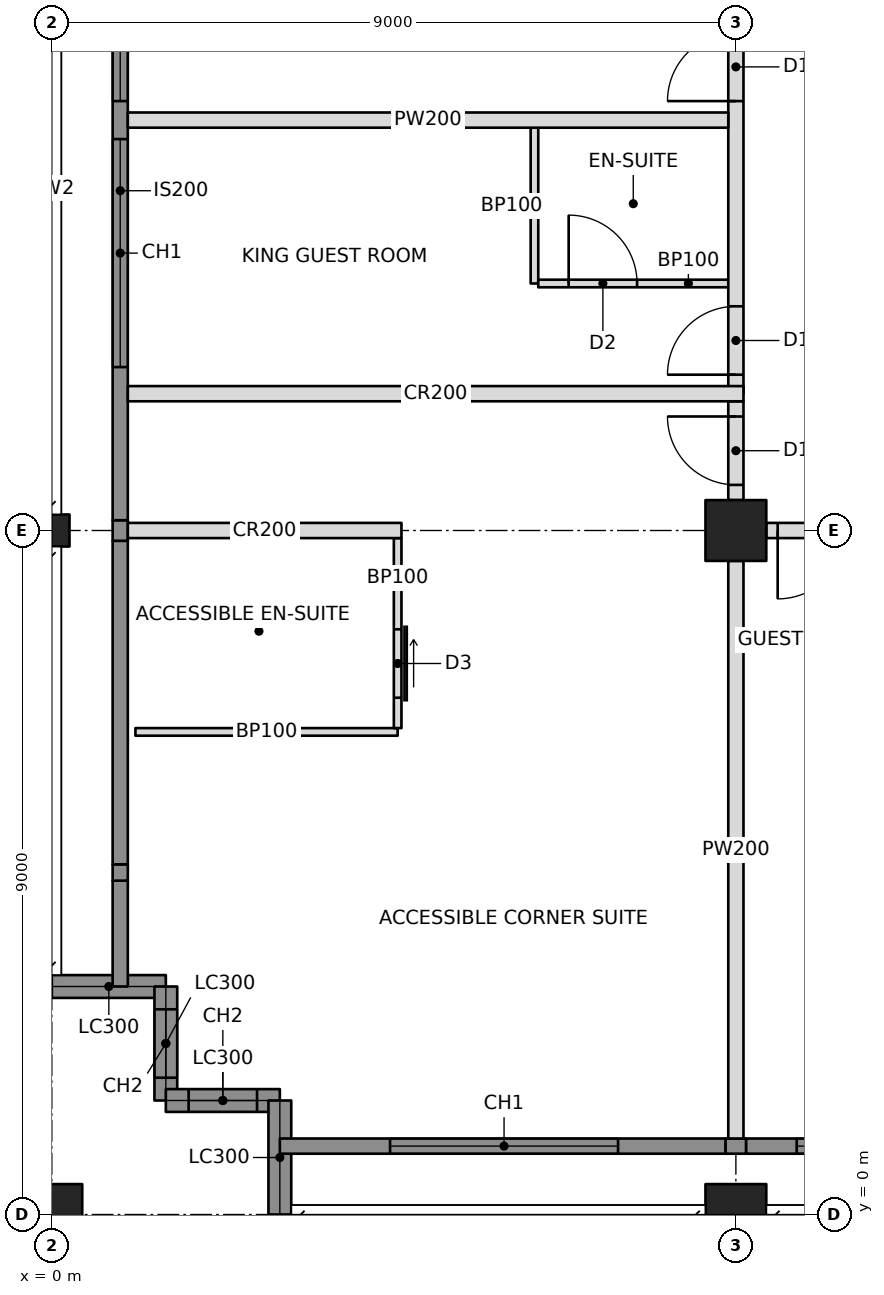
"""IFC4 building model, lengths in metres.
Left out: names, types, materials, properties, quantities, classifications, styles, units other than length and angle.
Written with IfcOpenShell. Run it as: python <this file> out.ifc"""

import sys

from ifc_helpers import new_model, si_unit, direction, frame, frame_2d, origin, origin_with_axes, origin_2d, place, context, subcontext, project, spatial, rectangle, hollow_rectangle, i_section, extrude, element, fill, save


model = new_model("IFC4")
c1 = context("Model", 3, precision=1e-05, world=origin(), true_north=direction((0.0, 1.0)))
c2 = subcontext(c1, "Body", "Model", "MODEL_VIEW")
j1 = project(units=[si_unit("LENGTHUNIT", "METRE"), si_unit("PLANEANGLEUNIT", "RADIAN")], contexts=[c1])
p1 = place(None, origin())
s1 = spatial("IfcSite", under=j1, at=p1, CompositionType="ELEMENT")
p2 = place(p1, origin())
s2 = spatial("IfcBuilding", under=s1, at=p2, CompositionType="ELEMENT")
p3 = place(p2, frame((0.0, 0.0, 241.0)))
s3 = spatial("IfcBuildingStorey", under=s2, at=p3, CompositionType="ELEMENT", Elevation=241.0)
p4 = place(p3, origin_with_axes())
e1 = element("IfcColumn", 1, at=p4, inside=s3, PredefinedType="COLUMN", context=c2, shape_type="SweptSolid", body=[
    extrude(hollow_rectangle(XDim=0.8, YDim=0.8, WallThickness=0.05, at=origin_2d()), origin(), (0.0, 0.0, 1.0), 3.6),
])
p5 = place(p3, frame((0.0, 9.0, 0.0), z_axis=(0.0, 0.0, 1.0), x_axis=(0.0, 1.0, 0.0)))
e2 = element("IfcColumn", 2, at=p5, inside=s3, PredefinedType="COLUMN", context=c2, shape_type="SweptSolid", body=[
    extrude(i_section(OverallWidth=0.422, OverallDepth=0.465, WebThickness=0.045, FlangeThickness=0.073, at=origin_2d()), origin(), (0.0, 0.0, 1.0), 3.6),
])
p6 = place(p3, frame((9.0, 0.0, 0.0), z_axis=(0.0, 0.0, 1.0), x_axis=(1.0, 0.0, 0.0)))
e3 = element("IfcColumn", 3, at=p6, inside=s3, PredefinedType="COLUMN", context=c2, shape_type="SweptSolid", body=[
    extrude(hollow_rectangle(XDim=0.8, YDim=0.8, WallThickness=0.05, at=origin_2d()), origin(), (0.0, 0.0, 1.0), 3.6),
])
p7 = place(p3, frame((9.0, 9.0, 0.0), z_axis=(0.0, 0.0, 1.0), x_axis=(1.0, 0.0, 0.0)))
e4 = element("IfcColumn", 4, at=p7, inside=s3, PredefinedType="COLUMN", context=c2, shape_type="SweptSolid", body=[
    extrude(hollow_rectangle(XDim=0.8, YDim=0.8, WallThickness=0.04, at=origin_2d()), origin(), (0.0, 0.0, 1.0), 3.6),
])
p8 = place(p3, frame((0.0, 3.0, 0.0), z_axis=(0.0, 0.0, 1.0), x_axis=(1.0, 0.0, 0.0)))
e5 = element("IfcWall", 5, at=p8, inside=s3, PredefinedType="SOLIDWALL", context=c2, shape_type="SweptSolid", body=[
    extrude(rectangle(XDim=1.5, YDim=0.3, at=frame_2d((0.75, 0.0))), origin(), (0.0, 0.0, 1.0), 2.62),
])
p9 = place(p3, frame((1.5, 3.0, 0.0), z_axis=(0.0, 0.0, 1.0), x_axis=(0.0, -1.0, 0.0)))
e6 = element("IfcWall", 6, at=p9, inside=s3, PredefinedType="SOLIDWALL", context=c2, shape_type="SweptSolid", body=[
    extrude(rectangle(XDim=1.5, YDim=0.3, at=frame_2d((0.75, 0.0))), origin(), (0.0, 0.0, 1.0), 3.4),
])
p10 = place(p9, frame((0.3, 0.0, 0.6)))
e7 = element("IfcOpeningElement", 7, at=p10, cuts=e6, PredefinedType="OPENING", context=c2, shape_type="SweptSolid", body=[
    extrude(rectangle(XDim=0.9, YDim=2.2, at=frame_2d((0.45, 1.1))), frame((0.0, 0.16, 0.0), z_axis=(0.0, -1.0, 0.0), x_axis=(1.0, 0.0, 0.0)), (0.0, 0.0, 1.0), 0.32),
])
p11 = place(p3, frame((1.5, 1.5, 0.0), z_axis=(0.0, 0.0, 1.0), x_axis=(1.0, 0.0, 0.0)))
e8 = element("IfcWall", 8, at=p11, inside=s3, PredefinedType="SOLIDWALL", context=c2, shape_type="SweptSolid", body=[
    extrude(rectangle(XDim=1.5, YDim=0.3, at=frame_2d((0.75, 0.0))), origin(), (0.0, 0.0, 1.0), 3.4),
])
p12 = place(p11, frame((0.3, 0.0, 0.6)))
e9 = element("IfcOpeningElement", 9, at=p12, cuts=e8, PredefinedType="OPENING", context=c2, shape_type="SweptSolid", body=[
    extrude(rectangle(XDim=0.9, YDim=2.2, at=frame_2d((0.45, 1.1))), frame((0.0, 0.16, 0.0), z_axis=(0.0, -1.0, 0.0), x_axis=(1.0, 0.0, 0.0)), (0.0, 0.0, 1.0), 0.32),
])
p13 = place(p3, frame((3.0, 1.5, 0.0), z_axis=(0.0, 0.0, 1.0), x_axis=(0.0, -1.0, 0.0)))
e10 = element("IfcWall", 10, at=p13, inside=s3, PredefinedType="SOLIDWALL", context=c2, shape_type="SweptSolid", body=[
    extrude(rectangle(XDim=1.5, YDim=0.3, at=frame_2d((0.75, 0.0))), origin(), (0.0, 0.0, 1.0), 2.62),
])
p14 = place(p3, frame((3.0, 0.9, 0.0), z_axis=(0.0, 0.0, 1.0), x_axis=(1.0, 0.0, 0.0)))
e11 = element("IfcWall", 11, at=p14, inside=s3, PredefinedType="SOLIDWALL", context=c2, shape_type="SweptSolid", body=[
    extrude(rectangle(XDim=5.865, YDim=0.2, at=frame_2d((2.932, 0.0))), origin(), (0.0, 0.0, 1.0), 3.4),
])
p15 = place(p14, frame((1.45, 0.0, 0.6)))
e12 = element("IfcOpeningElement", 12, at=p15, cuts=e11, PredefinedType="OPENING", context=c2, shape_type="SweptSolid", body=[
    extrude(rectangle(XDim=3.0, YDim=2.2, at=frame_2d((1.5, 1.1))), frame((0.0, 0.11, 0.0), z_axis=(0.0, -1.0, 0.0), x_axis=(1.0, 0.0, 0.0)), (0.0, 0.0, 1.0), 0.22),
])
p16 = place(p3, frame((0.9, 3.0, 0.0), z_axis=(0.0, 0.0, 1.0), x_axis=(0.0, 1.0, 0.0)))
e13 = element("IfcWall", 13, at=p16, inside=s3, PredefinedType="SOLIDWALL", context=c2, shape_type="SweptSolid", body=[
    extrude(rectangle(XDim=1.393, YDim=0.2, at=frame_2d((0.696, 0.0))), origin(), (0.0, 0.0, 1.0), 3.4),
])
p17 = place(p3, frame((1.0, 9.0, 0.0), z_axis=(0.0, 0.0, 1.0), x_axis=(1.0, 0.0, 0.0)))
e14 = element("IfcWall", 14, at=p17, inside=s3, PredefinedType="PARTITIONING", context=c2, shape_type="SweptSolid", body=[
    extrude(rectangle(XDim=3.6, YDim=0.2, at=frame_2d((1.8, 0.0))), origin(), (0.0, 0.0, 1.0), 2.638),
])
p18 = place(p3, frame((9.4, 9.0, 0.0), z_axis=(0.0, 0.0, 1.0), x_axis=(1.0, 0.0, 0.0)))
e15 = element("IfcWall", 15, at=p18, inside=s3, PredefinedType="PARTITIONING", context=c2, shape_type="SweptSolid", body=[
    extrude(rectangle(XDim=8.2, YDim=0.2, at=frame_2d((4.1, 0.0))), origin(), (0.0, 0.0, 1.0), 2.605),
])
p19 = place(p18, frame((0.15, 0.0, 0.0)))
e16 = element("IfcOpeningElement", 16, at=p19, cuts=e15, PredefinedType="OPENING", context=c2, shape_type="SweptSolid", body=[
    extrude(rectangle(XDim=0.9, YDim=2.1, at=frame_2d((0.45, 1.05))), frame((0.0, 0.11, 0.0), z_axis=(0.0, -1.0, 0.0), x_axis=(1.0, 0.0, 0.0)), (0.0, 0.0, 1.0), 0.22),
])
p20 = place(p3, frame((9.0, 10.8, 0.0), z_axis=(0.0, 0.0, 1.0), x_axis=(0.0, 1.0, 0.0)))
e17 = element("IfcWall", 17, at=p20, inside=s3, PredefinedType="PARTITIONING", context=c2, shape_type="SweptSolid", body=[
    extrude(rectangle(XDim=6.8, YDim=0.2, at=frame_2d((3.4, 0.0))), origin(), (0.0, 0.0, 1.0), 2.605),
])
p21 = place(p20, frame((0.25, 0.0, 0.0)))
e18 = element("IfcOpeningElement", 18, at=p21, cuts=e17, PredefinedType="OPENING", context=c2, shape_type="SweptSolid", body=[
    extrude(rectangle(XDim=0.9, YDim=2.1, at=frame_2d((0.45, 1.05))), frame((0.0, 0.11, 0.0), z_axis=(0.0, -1.0, 0.0), x_axis=(1.0, 0.0, 0.0)), (0.0, 0.0, 1.0), 0.22),
])
p22 = place(p20, frame((3.85, 0.0, 0.0)))
e19 = element("IfcOpeningElement", 19, at=p22, cuts=e17, PredefinedType="OPENING", context=c2, shape_type="SweptSolid", body=[
    extrude(rectangle(XDim=0.9, YDim=2.1, at=frame_2d((0.45, 1.05))), frame((0.0, 0.11, 0.0), z_axis=(0.0, -1.0, 0.0), x_axis=(1.0, 0.0, 0.0)), (0.0, 0.0, 1.0), 0.22),
])
p23 = place(p3, frame((1.0, 10.8, 0.0), z_axis=(0.0, 0.0, 1.0), x_axis=(1.0, 0.0, 0.0)))
e20 = element("IfcWall", 20, at=p23, inside=s3, PredefinedType="PARTITIONING", context=c2, shape_type="SweptSolid", body=[
    extrude(rectangle(XDim=8.1, YDim=0.2, at=frame_2d((4.05, 0.0))), origin(), (0.0, 0.0, 1.0), 2.604),
])
p24 = place(p3, frame((9.0, 8.6, 0.0), z_axis=(0.0, 0.0, 1.0), x_axis=(0.0, -1.0, 0.0)))
e21 = element("IfcWall", 21, at=p24, inside=s3, PredefinedType="PARTITIONING", context=c2, shape_type="SweptSolid", body=[
    extrude(rectangle(XDim=7.6, YDim=0.2, at=frame_2d((3.8, 0.0))), origin(), (0.0, 0.0, 1.0), 2.638),
])
p25 = place(p3, frame((1.1, 6.35, 0.0), z_axis=(0.0, 0.0, 1.0), x_axis=(1.0, 0.0, 0.0)))
e22 = element("IfcWall", 22, at=p25, inside=s3, PredefinedType="PARTITIONING", context=c2, shape_type="SweptSolid", body=[
    extrude(rectangle(XDim=3.45, YDim=0.1, at=frame_2d((1.725, 0.0))), origin(), (0.0, 0.0, 1.0), 3.4),
])
p26 = place(p3, frame((4.55, 8.9, 0.0), z_axis=(0.0, 0.0, 1.0), x_axis=(0.0, -1.0, 0.0)))
e23 = element("IfcWall", 23, at=p26, inside=s3, PredefinedType="PARTITIONING", context=c2, shape_type="SweptSolid", body=[
    extrude(rectangle(XDim=2.5, YDim=0.1, at=frame_2d((1.25, 0.0))), origin(), (0.0, 0.0, 1.0), 2.638),
])
p27 = place(p26, frame((1.2, 0.0, 0.0)))
e24 = element("IfcOpeningElement", 24, at=p27, cuts=e23, PredefinedType="OPENING", context=c2, shape_type="SweptSolid", body=[
    extrude(rectangle(XDim=0.9, YDim=2.1, at=frame_2d((0.45, 1.05))), frame((0.0, 0.06, 0.0), z_axis=(0.0, -1.0, 0.0), x_axis=(1.0, 0.0, 0.0)), (0.0, 0.0, 1.0), 0.12),
])
p28 = place(p3, frame((8.9, 14.4, 0.0), z_axis=(0.0, 0.0, 1.0), x_axis=(-1.0, 0.0, 0.0)))
e25 = element("IfcWall", 25, at=p28, inside=s3, PredefinedType="PARTITIONING", context=c2, shape_type="SweptSolid", body=[
    extrude(rectangle(XDim=7.9, YDim=0.2, at=frame_2d((3.95, 0.0))), origin(), (0.0, 0.0, 1.0), 2.604),
])
p29 = place(p3, frame((6.35, 12.25, 0.0), z_axis=(0.0, 0.0, 1.0), x_axis=(0.0, 1.0, 0.0)))
e26 = element("IfcWall", 26, at=p29, inside=s3, PredefinedType="PARTITIONING", context=c2, shape_type="SweptSolid", body=[
    extrude(rectangle(XDim=2.05, YDim=0.1, at=frame_2d((1.025, 0.0))), origin(), (0.0, 0.0, 1.0), 3.4),
])
p30 = place(p3, frame((8.9, 12.25, 0.0), z_axis=(0.0, 0.0, 1.0), x_axis=(-1.0, 0.0, 0.0)))
e27 = element("IfcWall", 27, at=p30, inside=s3, PredefinedType="PARTITIONING", context=c2, shape_type="SweptSolid", body=[
    extrude(rectangle(XDim=2.5, YDim=0.1, at=frame_2d((1.25, 0.0))), origin(), (0.0, 0.0, 1.0), 2.604),
])
p31 = place(p30, frame((1.2, 0.0, 0.0)))
e28 = element("IfcOpeningElement", 28, at=p31, cuts=e27, PredefinedType="OPENING", context=c2, shape_type="SweptSolid", body=[
    extrude(rectangle(XDim=0.9, YDim=2.1, at=frame_2d((0.45, 1.05))), frame((0.0, 0.06, 0.0), z_axis=(0.0, -1.0, 0.0), x_axis=(1.0, 0.0, 0.0)), (0.0, 0.0, 1.0), 0.12),
])
p32 = place(p3, frame((9.0, 9.4, 0.0), z_axis=(0.0, 0.0, 1.0), x_axis=(0.0, 1.0, 0.0)))
e29 = element("IfcWall", 29, at=p32, inside=s3, PredefinedType="PARTITIONING", context=c2, shape_type="SweptSolid", body=[
    extrude(rectangle(XDim=1.3, YDim=0.2, at=frame_2d((0.65, 0.0))), origin(), (0.0, 0.0, 1.0), 2.605),
])
p33 = place(p32, frame((0.2, 0.0, 0.0)))
e30 = element("IfcOpeningElement", 30, at=p33, cuts=e29, PredefinedType="OPENING", context=c2, shape_type="SweptSolid", body=[
    extrude(rectangle(XDim=0.9, YDim=2.1, at=frame_2d((0.45, 1.05))), frame((0.0, 0.11, 0.0), z_axis=(0.0, -1.0, 0.0), x_axis=(1.0, 0.0, 0.0)), (0.0, 0.0, 1.0), 0.22),
])
p34 = place(p3, frame((8.865, 0.9, 0.0), z_axis=(0.0, 0.0, 1.0), x_axis=(1.0, 0.0, 0.0)))
e31 = element("IfcWall", 31, at=p34, inside=s3, PredefinedType="SOLIDWALL", context=c2, shape_type="SweptSolid", body=[
    extrude(rectangle(XDim=0.271, YDim=0.2, at=frame_2d((0.135, 0.0))), origin(), (0.0, 0.0, 1.0), 2.638),
])
p35 = place(p3, frame((9.135, 0.9, 0.0), z_axis=(0.0, 0.0, 1.0), x_axis=(1.0, 0.0, 0.0)))
e32 = element("IfcWall", 32, at=p35, inside=s3, PredefinedType="SOLIDWALL", context=c2, shape_type="SweptSolid", body=[
    extrude(rectangle(XDim=8.671, YDim=0.2, at=frame_2d((4.335, 0.0))), origin(), (0.0, 0.0, 1.0), 3.4),
])
p36 = place(p35, frame((0.665, 0.0, 0.6)))
e33 = element("IfcOpeningElement", 33, at=p36, cuts=e32, PredefinedType="OPENING", context=c2, shape_type="SweptSolid", body=[
    extrude(rectangle(XDim=3.0, YDim=2.2, at=frame_2d((1.5, 1.1))), frame((0.0, 0.11, 0.0), z_axis=(0.0, -1.0, 0.0), x_axis=(1.0, 0.0, 0.0)), (0.0, 0.0, 1.0), 0.22),
])
p37 = place(p35, frame((5.065, 0.0, 0.6)))
e34 = element("IfcOpeningElement", 34, at=p37, cuts=e32, PredefinedType="OPENING", context=c2, shape_type="SweptSolid", body=[
    extrude(rectangle(XDim=3.0, YDim=2.2, at=frame_2d((1.5, 1.1))), frame((0.0, 0.11, 0.0), z_axis=(0.0, -1.0, 0.0), x_axis=(1.0, 0.0, 0.0)), (0.0, 0.0, 1.0), 0.22),
])
p38 = place(p3, frame((0.9, 4.393, 0.0), z_axis=(0.0, 0.0, 1.0), x_axis=(0.0, 1.0, 0.0)))
e35 = element("IfcWall", 35, at=p38, inside=s3, PredefinedType="SOLIDWALL", context=c2, shape_type="SweptSolid", body=[
    extrude(rectangle(XDim=0.215, YDim=0.2, at=frame_2d((0.107, 0.0))), origin(), (0.0, 0.0, 1.0), 2.861),
])
p39 = place(p3, frame((0.9, 4.607, 0.0), z_axis=(0.0, 0.0, 1.0), x_axis=(0.0, 1.0, 0.0)))
e36 = element("IfcWall", 36, at=p39, inside=s3, PredefinedType="SOLIDWALL", context=c2, shape_type="SweptSolid", body=[
    extrude(rectangle(XDim=4.257, YDim=0.2, at=frame_2d((2.129, 0.0))), origin(), (0.0, 0.0, 1.0), 3.4),
])
p40 = place(p3, frame((0.9, 8.865, 0.0), z_axis=(0.0, 0.0, 1.0), x_axis=(0.0, 1.0, 0.0)))
e37 = element("IfcWall", 37, at=p40, inside=s3, PredefinedType="SOLIDWALL", context=c2, shape_type="SweptSolid", body=[
    extrude(rectangle(XDim=0.271, YDim=0.2, at=frame_2d((0.135, 0.0))), origin(), (0.0, 0.0, 1.0), 2.638),
])
p41 = place(p3, frame((0.9, 9.135, 0.0), z_axis=(0.0, 0.0, 1.0), x_axis=(0.0, 1.0, 0.0)))
e38 = element("IfcWall", 38, at=p41, inside=s3, PredefinedType="SOLIDWALL", context=c2, shape_type="SweptSolid", body=[
    extrude(rectangle(XDim=8.671, YDim=0.2, at=frame_2d((4.335, 0.0))), origin(), (0.0, 0.0, 1.0), 3.4),
])
p42 = place(p41, frame((2.015, 0.0, 0.6)))
e39 = element("IfcOpeningElement", 39, at=p42, cuts=e38, PredefinedType="OPENING", context=c2, shape_type="SweptSolid", body=[
    extrude(rectangle(XDim=3.0, YDim=2.2, at=frame_2d((1.5, 1.1))), frame((0.0, 0.11, 0.0), z_axis=(0.0, -1.0, 0.0), x_axis=(1.0, 0.0, 0.0)), (0.0, 0.0, 1.0), 0.22),
])
p43 = place(p41, frame((5.515, 0.0, 0.6)))
e40 = element("IfcOpeningElement", 40, at=p43, cuts=e38, PredefinedType="OPENING", context=c2, shape_type="SweptSolid", body=[
    extrude(rectangle(XDim=3.0, YDim=2.2, at=frame_2d((1.5, 1.1))), frame((0.0, 0.11, 0.0), z_axis=(0.0, -1.0, 0.0), x_axis=(1.0, 0.0, 0.0)), (0.0, 0.0, 1.0), 0.22),
])
p44 = place(p10, origin())
e41 = element("IfcWindow", 41, at=p44, inside=s3, PartitioningType="SINGLE_PANEL", PredefinedType="WINDOW", context=c2, shape_type="SweptSolid", body=[
    extrude(rectangle(XDim=0.9, YDim=2.2, at=frame_2d((0.45, 1.1))), frame((0.0, 0.03, 0.0), z_axis=(0.0, -1.0, 0.0), x_axis=(1.0, 0.0, 0.0)), (0.0, 0.0, 1.0), 0.06),
])
fill(e7, e41)
p45 = place(p12, origin())
e42 = element("IfcWindow", 42, at=p45, inside=s3, PartitioningType="SINGLE_PANEL", PredefinedType="WINDOW", context=c2, shape_type="SweptSolid", body=[
    extrude(rectangle(XDim=0.9, YDim=2.2, at=frame_2d((0.45, 1.1))), frame((0.0, 0.03, 0.0), z_axis=(0.0, -1.0, 0.0), x_axis=(1.0, 0.0, 0.0)), (0.0, 0.0, 1.0), 0.06),
])
fill(e9, e42)
p46 = place(p15, origin())
e43 = element("IfcWindow", 43, at=p46, inside=s3, PartitioningType="TRIPLE_PANEL_VERTICAL", PredefinedType="WINDOW", context=c2, shape_type="SweptSolid", body=[
    extrude(rectangle(XDim=3.0, YDim=2.2, at=frame_2d((1.5, 1.1))), frame((0.0, 0.03, 0.0), z_axis=(0.0, -1.0, 0.0), x_axis=(1.0, 0.0, 0.0)), (0.0, 0.0, 1.0), 0.06),
])
fill(e12, e43)
p47 = place(p36, origin())
e44 = element("IfcWindow", 44, at=p47, inside=s3, PartitioningType="TRIPLE_PANEL_VERTICAL", PredefinedType="WINDOW", context=c2, shape_type="SweptSolid", body=[
    extrude(rectangle(XDim=3.0, YDim=2.2, at=frame_2d((1.5, 1.1))), frame((0.0, 0.03, 0.0), z_axis=(0.0, -1.0, 0.0), x_axis=(1.0, 0.0, 0.0)), (0.0, 0.0, 1.0), 0.06),
])
fill(e33, e44)
p48 = place(p42, origin())
e45 = element("IfcWindow", 45, at=p48, inside=s3, PartitioningType="TRIPLE_PANEL_VERTICAL", PredefinedType="WINDOW", context=c2, shape_type="SweptSolid", body=[
    extrude(rectangle(XDim=3.0, YDim=2.2, at=frame_2d((1.5, 1.1))), frame((0.0, 0.03, 0.0), z_axis=(0.0, -1.0, 0.0), x_axis=(1.0, 0.0, 0.0)), (0.0, 0.0, 1.0), 0.06),
])
fill(e39, e45)
p49 = place(p43, origin())
e46 = element("IfcWindow", 46, at=p49, inside=s3, PartitioningType="TRIPLE_PANEL_VERTICAL", PredefinedType="WINDOW", context=c2, shape_type="SweptSolid", body=[
    extrude(rectangle(XDim=3.0, YDim=2.2, at=frame_2d((1.5, 1.1))), frame((0.0, 0.03, 0.0), z_axis=(0.0, -1.0, 0.0), x_axis=(1.0, 0.0, 0.0)), (0.0, 0.0, 1.0), 0.06),
])
fill(e40, e46)
p50 = place(p27, origin())
e47 = element("IfcDoor", 47, at=p50, inside=s3, OperationType="SLIDING_TO_LEFT", PredefinedType="DOOR", context=c2, shape_type="SweptSolid", body=[
    extrude(rectangle(XDim=0.9, YDim=2.1, at=frame_2d((0.45, 1.05))), frame((0.0, 0.025, 0.0), z_axis=(0.0, -1.0, 0.0), x_axis=(1.0, 0.0, 0.0)), (0.0, 0.0, 1.0), 0.05),
])
fill(e24, e47)
p51 = place(p19, frame((0.9, 0.0, 0.0), z_axis=(0.0, 0.0, 1.0), x_axis=(-1.0, 0.0, 0.0)))
e48 = element("IfcDoor", 48, at=p51, inside=s3, OperationType="SINGLE_SWING_RIGHT", PredefinedType="DOOR", context=c2, shape_type="SweptSolid", body=[
    extrude(rectangle(XDim=0.9, YDim=2.1, at=frame_2d((0.45, 1.05))), frame((0.0, 0.025, 0.0), z_axis=(0.0, -1.0, 0.0), x_axis=(1.0, 0.0, 0.0)), (0.0, 0.0, 1.0), 0.05),
])
fill(e16, e48)
p52 = place(p31, frame((0.9, 0.0, 0.0), z_axis=(0.0, 0.0, 1.0), x_axis=(-1.0, 0.0, 0.0)))
e49 = element("IfcDoor", 49, at=p52, inside=s3, OperationType="SINGLE_SWING_LEFT", PredefinedType="DOOR", context=c2, shape_type="SweptSolid", body=[
    extrude(rectangle(XDim=0.9, YDim=2.1, at=frame_2d((0.45, 1.05))), frame((0.0, 0.025, 0.0), z_axis=(0.0, -1.0, 0.0), x_axis=(1.0, 0.0, 0.0)), (0.0, 0.0, 1.0), 0.05),
])
fill(e28, e49)
p53 = place(p21, origin())
e50 = element("IfcDoor", 50, at=p53, inside=s3, OperationType="SINGLE_SWING_LEFT", PredefinedType="DOOR", context=c2, shape_type="SweptSolid", body=[
    extrude(rectangle(XDim=0.9, YDim=2.1, at=frame_2d((0.45, 1.05))), frame((0.0, 0.025, 0.0), z_axis=(0.0, -1.0, 0.0), x_axis=(1.0, 0.0, 0.0)), (0.0, 0.0, 1.0), 0.05),
])
fill(e18, e50)
p54 = place(p22, origin())
e51 = element("IfcDoor", 51, at=p54, inside=s3, OperationType="SINGLE_SWING_LEFT", PredefinedType="DOOR", context=c2, shape_type="SweptSolid", body=[
    extrude(rectangle(XDim=0.9, YDim=2.1, at=frame_2d((0.45, 1.05))), frame((0.0, 0.025, 0.0), z_axis=(0.0, -1.0, 0.0), x_axis=(1.0, 0.0, 0.0)), (0.0, 0.0, 1.0), 0.05),
])
fill(e19, e51)
p55 = place(p33, origin())
e52 = element("IfcDoor", 52, at=p55, inside=s3, OperationType="SINGLE_SWING_RIGHT", PredefinedType="DOOR", context=c2, shape_type="SweptSolid", body=[
    extrude(rectangle(XDim=0.9, YDim=2.1, at=frame_2d((0.45, 1.05))), frame((0.0, 0.025, 0.0), z_axis=(0.0, -1.0, 0.0), x_axis=(1.0, 0.0, 0.0)), (0.0, 0.0, 1.0), 0.05),
])
fill(e30, e52)
save(model, sys.argv[1])
